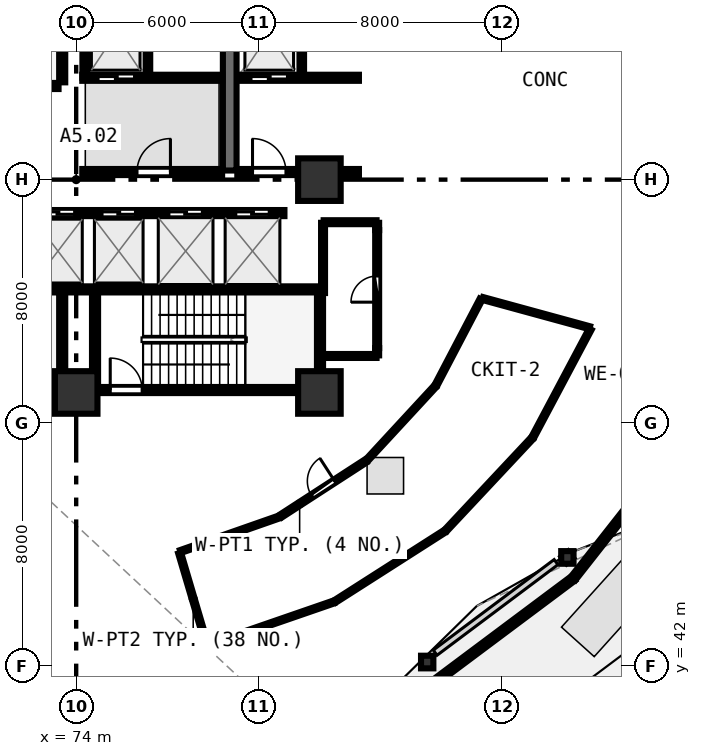
"""IFC4 building model, lengths in metres.
Left out: names, types, materials, properties, quantities, classifications, styles, units other than length and angle.
Written with IfcOpenShell. Run it as: python <this file> out.ifc"""

import sys

from ifc_helpers import new_model, si_unit, direction, frame, frame_2d, origin, origin_2d, place, context, subcontext, project, spatial, rectangle, i_section, extrude, element, fill, save


model = new_model("IFC4")
c1 = context("Model", 3, precision=1e-05, world=origin(), true_north=direction((0.0, 1.0)))
c2 = subcontext(c1, "Body", "Model", "MODEL_VIEW")
j1 = project(units=[si_unit("LENGTHUNIT", "METRE"), si_unit("PLANEANGLEUNIT", "RADIAN")], contexts=[c1])
p1 = place(None, origin())
s1 = spatial("IfcSite", under=j1, at=p1, CompositionType="ELEMENT")
p2 = place(p1, origin())
s2 = spatial("IfcBuilding", under=s1, at=p2, CompositionType="ELEMENT")
p3 = place(p2, origin())
s3 = spatial("IfcBuildingStorey", under=s2, at=p3, CompositionType="ELEMENT", Elevation=0.0)
for number, where, z_axis, x_axis in (
    (1, (74.0, 51.0, 0.0), (0.0, 0.0, 1.0), (1.0, 0.0, 0.0)),
    (2, (82.0, 51.0, 0.0), (0.0, 0.0, 1.0), (1.0, 0.0, 0.0)),
    (3, (82.0, 58.0, 0.0), (0.0, 0.0, 1.0), (1.0, 0.0, 0.0)),
):
    element("IfcColumn", number, at=place(p3, frame(where, z_axis=z_axis, x_axis=x_axis)), inside=s3, PredefinedType="PILASTER", context=c2, shape_type="SweptSolid", body=[
        extrude(rectangle(XDim=1.4, YDim=1.4, at=origin_2d()), origin(), (0.0, 0.0, 1.0), 4.5),
    ])
for number, where, z_axis, x_axis in (
    (4, (85.546, 42.134, 0.0), (0.0, 0.0, 1.0), (1.0, 0.0, 0.0)),
    (5, (90.156, 45.574, 0.0), (0.0, 0.0, 1.0), (1.0, 0.0, 0.0)),
):
    element("IfcColumn", number, at=place(p3, frame(where, z_axis=z_axis, x_axis=x_axis)), inside=s3, PredefinedType="COLUMN", context=c2, shape_type="SweptSolid", body=[
        extrude(i_section(OverallWidth=0.406, OverallDepth=0.416, WebThickness=0.029, FlangeThickness=0.048, FilletRadius=0.015, at=origin_2d()), origin(), (0.0, 0.0, 1.0), 4.5),
    ])
p4 = place(p3, frame((85.658, 41.378, 0.0), z_axis=(0.0, 0.0, 1.0), x_axis=(0.800949430728, 0.59873200133, 0.0)))
e6 = element("IfcWall", 6, at=p4, inside=s3, PredefinedType="PARAPET", context=c2, shape_type="SweptSolid", body=[
    extrude(rectangle(XDim=5.857, YDim=0.19, at=frame_2d((2.928, 0.0))), origin(), (0.0, 0.0, 1.0), 0.62),
])
p5 = place(p3, frame((90.349, 44.885, 0.0), z_axis=(0.0, 0.0, 1.0), x_axis=(0.617936357215, 0.786228121115, 0.0)))
e7 = element("IfcWall", 7, at=p5, inside=s3, PredefinedType="PARAPET", context=c2, shape_type="SweptSolid", body=[
    extrude(rectangle(XDim=4.977, YDim=0.19, at=frame_2d((2.489, 0.0))), origin(), (0.0, 0.0, 1.0), 0.62),
])
p6 = place(p3, frame((66.26, 61.08, 0.0), z_axis=(0.0, 0.0, 1.0), x_axis=(1.0, 0.0, 0.0)))
e8 = element("IfcWall", 8, at=p6, inside=s3, PredefinedType="SHEAR", context=c2, shape_type="SweptSolid", body=[
    extrude(rectangle(XDim=7.16, YDim=0.2, at=frame_2d((3.58, 0.0))), origin(), (0.0, 0.0, 1.0), 4.2),
])
p7 = place(p3, frame((73.54, 61.2, 0.0), z_axis=(0.0, 0.0, 1.0), x_axis=(0.0, 1.0, 0.0)))
e9 = element("IfcWall", 9, at=p7, inside=s3, PredefinedType="SHEAR", context=c2, shape_type="SweptSolid", body=[
    extrude(rectangle(XDim=3.07, YDim=0.2, at=frame_2d((1.535, 0.0))), origin(), (0.0, 0.0, 1.0), 4.2),
])
p8 = place(p3, frame((74.0, 51.08, 0.0), z_axis=(0.0, 0.0, 1.0), x_axis=(1.0, 0.0, 0.0)))
e10 = element("IfcWall", 10, at=p8, inside=s3, PredefinedType="SHEAR", context=c2, shape_type="SweptSolid", body=[
    extrude(rectangle(XDim=7.9, YDim=0.2, at=frame_2d((3.95, 0.0))), origin(), (0.0, 0.0, 1.0), 4.2),
])
p9 = place(p8, frame((1.12, 0.0, 0.0)))
e11 = element("IfcOpeningElement", 11, at=p9, cuts=e10, PredefinedType="OPENING", context=c2, shape_type="SweptSolid", body=[
    extrude(rectangle(XDim=1.05, YDim=2.1, at=frame_2d((0.525, 1.05))), frame((0.0, 0.11, 0.0), z_axis=(0.0, -1.0, 0.0), x_axis=(1.0, 0.0, 0.0)), (0.0, 0.0, 1.0), 0.22),
])
p10 = place(p3, frame((82.02, 51.2, 0.0), z_axis=(0.0, 0.0, 1.0), x_axis=(0.0, 1.0, 0.0)))
e12 = element("IfcWall", 12, at=p10, inside=s3, PredefinedType="SHEAR", context=c2, shape_type="SweptSolid", body=[
    extrude(rectangle(XDim=3.07, YDim=0.2, at=frame_2d((1.535, 0.0))), origin(), (0.0, 0.0, 1.0), 4.2),
])
p11 = place(p3, frame((81.9, 54.39, 0.0), z_axis=(0.0, 0.0, 1.0), x_axis=(-1.0, 0.0, 0.0)))
e13 = element("IfcWall", 13, at=p11, inside=s3, PredefinedType="SHEAR", context=c2, shape_type="SweptSolid", body=[
    extrude(rectangle(XDim=8.46, YDim=0.2, at=frame_2d((4.23, 0.0))), origin(), (0.0, 0.0, 1.0), 4.2),
])
p12 = place(p3, frame((74.62, 54.27, 0.0), z_axis=(0.0, 0.0, 1.0), x_axis=(0.0, -1.0, 0.0)))
e14 = element("IfcWall", 14, at=p12, inside=s3, PredefinedType="SHEAR", context=c2, shape_type="SweptSolid", body=[
    extrude(rectangle(XDim=3.07, YDim=0.2, at=frame_2d((1.535, 0.0))), origin(), (0.0, 0.0, 1.0), 4.2),
])
p13 = place(p3, frame((66.26, 51.08, 0.0), z_axis=(0.0, 0.0, 1.0), x_axis=(1.0, 0.0, 0.0)))
e15 = element("IfcWall", 15, at=p13, inside=s3, PredefinedType="SHEAR", context=c2, shape_type="SweptSolid", body=[
    extrude(rectangle(XDim=7.16, YDim=0.2, at=frame_2d((3.58, 0.0))), origin(), (0.0, 0.0, 1.0), 4.2),
])
p14 = place(p3, frame((73.54, 51.2, 0.0), z_axis=(0.0, 0.0, 1.0), x_axis=(0.0, 1.0, 0.0)))
e16 = element("IfcWall", 16, at=p14, inside=s3, PredefinedType="SHEAR", context=c2, shape_type="SweptSolid", body=[
    extrude(rectangle(XDim=3.07, YDim=0.2, at=frame_2d((1.535, 0.0))), origin(), (0.0, 0.0, 1.0), 4.2),
])
p15 = place(p3, frame((73.42, 54.39, 0.0), z_axis=(0.0, 0.0, 1.0), x_axis=(-1.0, 0.0, 0.0)))
e17 = element("IfcWall", 17, at=p15, inside=s3, PredefinedType="SHEAR", context=c2, shape_type="SweptSolid", body=[
    extrude(rectangle(XDim=7.16, YDim=0.2, at=frame_2d((3.58, 0.0))), origin(), (0.0, 0.0, 1.0), 4.2),
])
p16 = place(p3, frame((79.05, 58.3, 0.0), z_axis=(0.0, 0.0, 1.0), x_axis=(0.0, 1.0, 0.0)))
e18 = element("IfcWall", 18, at=p16, inside=s3, PredefinedType="SHEAR", context=c2, shape_type="SweptSolid", body=[
    extrude(rectangle(XDim=6.3, YDim=0.45, at=frame_2d((3.15, 0.0))), origin(), (0.0, 0.0, 1.0), 4.2),
])
p17 = place(p3, frame((74.2, 61.35, 0.0), z_axis=(0.0, 0.0, 1.0), x_axis=(1.0, 0.0, 0.0)))
e19 = element("IfcWall", 19, at=p17, inside=s3, PredefinedType="SOLIDWALL", context=c2, shape_type="SweptSolid", body=[
    extrude(rectangle(XDim=4.6, YDim=0.2, at=frame_2d((2.3, 0.0))), origin(), (0.0, 0.0, 1.0), 4.19),
])
p18 = place(p17, frame((0.52, 0.0, 0.0)))
e20 = element("IfcOpeningElement", 20, at=p18, cuts=e19, PredefinedType="OPENING", context=c2, shape_type="SweptSolid", body=[
    extrude(rectangle(XDim=1.2, YDim=2.15, at=frame_2d((0.6, 1.075))), frame((0.0, 0.11, 0.0), z_axis=(0.0, -1.0, 0.0), x_axis=(1.0, 0.0, 0.0)), (0.0, 0.0, 1.0), 0.22),
])
p19 = place(p3, frame((74.28, 61.35, 0.0), z_axis=(0.0, 0.0, 1.0), x_axis=(0.0, 1.0, 0.0)))
e21 = element("IfcWall", 21, at=p19, inside=s3, PredefinedType="PARTITIONING", context=c2, shape_type="SweptSolid", body=[
    extrude(rectangle(XDim=2.97, YDim=0.15, at=frame_2d((1.485, 0.0))), origin(), (0.0, 0.0, 1.0), 4.19),
])
p20 = place(p3, frame((76.36, 61.48, 0.0), z_axis=(0.0, 0.0, 1.0), x_axis=(0.0, 1.0, 0.0)))
e22 = element("IfcWall", 22, at=p20, inside=s3, PredefinedType="PARTITIONING", context=c2, shape_type="SweptSolid", body=[
    extrude(rectangle(XDim=2.84, YDim=0.15, at=frame_2d((1.42, 0.0))), origin(), (0.0, 0.0, 1.0), 4.19),
])
p21 = place(p3, frame((79.3, 61.35, 0.0), z_axis=(0.0, 0.0, 1.0), x_axis=(1.0, 0.0, 0.0)))
e23 = element("IfcWall", 23, at=p21, inside=s3, PredefinedType="SOLIDWALL", context=c2, shape_type="SweptSolid", body=[
    extrude(rectangle(XDim=4.0, YDim=0.2, at=frame_2d((2.0, 0.0))), origin(), (0.0, 0.0, 1.0), 3.485),
])
p22 = place(p21, frame((0.45, 0.0, 0.0)))
e24 = element("IfcOpeningElement", 24, at=p22, cuts=e23, PredefinedType="OPENING", context=c2, shape_type="SweptSolid", body=[
    extrude(rectangle(XDim=1.2, YDim=2.15, at=frame_2d((0.6, 1.075))), frame((0.0, 0.11, 0.0), z_axis=(0.0, -1.0, 0.0), x_axis=(1.0, 0.0, 0.0)), (0.0, 0.0, 1.0), 0.22),
])
p23 = place(p3, frame((81.42, 61.48, 0.0), z_axis=(0.0, 0.0, 1.0), x_axis=(0.0, 1.0, 0.0)))
e25 = element("IfcWall", 25, at=p23, inside=s3, PredefinedType="PARTITIONING", context=c2, shape_type="SweptSolid", body=[
    extrude(rectangle(XDim=2.84, YDim=0.15, at=frame_2d((1.42, 0.0))), origin(), (0.0, 0.0, 1.0), 4.19),
])
p24 = place(p3, frame((74.2, 58.25, 0.0), z_axis=(0.0, 0.0, 1.0), x_axis=(1.0, 0.0, 0.0)))
e26 = element("IfcWall", 26, at=p24, inside=s3, PredefinedType="SOLIDWALL", context=c2, shape_type="SweptSolid", body=[
    extrude(rectangle(XDim=4.6, YDim=0.2, at=frame_2d((2.3, 0.0))), origin(), (0.0, 0.0, 1.0), 4.19),
])
p25 = place(p24, frame((1.8, 0.0, 0.0)))
e27 = element("IfcOpeningElement", 27, at=p25, cuts=e26, PredefinedType="OPENING", context=c2, shape_type="SweptSolid", body=[
    extrude(rectangle(XDim=1.1, YDim=2.1, at=frame_2d((0.55, 1.05))), frame((0.0, 0.11, 0.0), z_axis=(0.0, -1.0, 0.0), x_axis=(1.0, 0.0, 0.0)), (0.0, 0.0, 1.0), 0.22),
])
p26 = place(p3, frame((79.3, 58.25, 0.0), z_axis=(0.0, 0.0, 1.0), x_axis=(1.0, 0.0, 0.0)))
e28 = element("IfcWall", 28, at=p26, inside=s3, PredefinedType="SOLIDWALL", context=c2, shape_type="SweptSolid", body=[
    extrude(rectangle(XDim=4.0, YDim=0.2, at=frame_2d((2.0, 0.0))), origin(), (0.0, 0.0, 1.0), 3.485),
])
p27 = place(p26, frame((0.5, 0.0, 0.0)))
e29 = element("IfcOpeningElement", 29, at=p27, cuts=e28, PredefinedType="OPENING", context=c2, shape_type="SweptSolid", body=[
    extrude(rectangle(XDim=1.1, YDim=2.1, at=frame_2d((0.55, 1.05))), frame((0.0, 0.11, 0.0), z_axis=(0.0, -1.0, 0.0), x_axis=(1.0, 0.0, 0.0)), (0.0, 0.0, 1.0), 0.22),
])
p28 = place(p3, frame((66.45, 56.9, 0.0), z_axis=(0.0, 0.0, 1.0), x_axis=(1.0, 0.0, 0.0)))
e30 = element("IfcWall", 30, at=p28, inside=s3, PredefinedType="SOLIDWALL", context=c2, shape_type="SweptSolid", body=[
    extrude(rectangle(XDim=14.4, YDim=0.2, at=frame_2d((7.2, 0.0))), origin(), (0.0, 0.0, 1.0), 4.19),
])
p29 = place(p28, frame((0.4, 0.0, 0.0)))
e31 = element("IfcOpeningElement", 31, at=p29, cuts=e30, PredefinedType="OPENING", context=c2, shape_type="SweptSolid", body=[
    extrude(rectangle(XDim=1.1, YDim=2.1, at=frame_2d((0.55, 1.05))), frame((0.0, 0.11, 0.0), z_axis=(0.0, -1.0, 0.0), x_axis=(1.0, 0.0, 0.0)), (0.0, 0.0, 1.0), 0.22),
])
p30 = place(p28, frame((2.4, 0.0, 0.0)))
e32 = element("IfcOpeningElement", 32, at=p30, cuts=e30, PredefinedType="OPENING", context=c2, shape_type="SweptSolid", body=[
    extrude(rectangle(XDim=1.1, YDim=2.1, at=frame_2d((0.55, 1.05))), frame((0.0, 0.11, 0.0), z_axis=(0.0, -1.0, 0.0), x_axis=(1.0, 0.0, 0.0)), (0.0, 0.0, 1.0), 0.22),
])
p31 = place(p28, frame((4.4, 0.0, 0.0)))
e33 = element("IfcOpeningElement", 33, at=p31, cuts=e30, PredefinedType="OPENING", context=c2, shape_type="SweptSolid", body=[
    extrude(rectangle(XDim=1.1, YDim=2.1, at=frame_2d((0.55, 1.05))), frame((0.0, 0.11, 0.0), z_axis=(0.0, -1.0, 0.0), x_axis=(1.0, 0.0, 0.0)), (0.0, 0.0, 1.0), 0.22),
])
p32 = place(p28, frame((6.4, 0.0, 0.0)))
e34 = element("IfcOpeningElement", 34, at=p32, cuts=e30, PredefinedType="OPENING", context=c2, shape_type="SweptSolid", body=[
    extrude(rectangle(XDim=1.1, YDim=2.1, at=frame_2d((0.55, 1.05))), frame((0.0, 0.11, 0.0), z_axis=(0.0, -1.0, 0.0), x_axis=(1.0, 0.0, 0.0)), (0.0, 0.0, 1.0), 0.22),
])
p33 = place(p28, frame((8.4, 0.0, 0.0)))
e35 = element("IfcOpeningElement", 35, at=p33, cuts=e30, PredefinedType="OPENING", context=c2, shape_type="SweptSolid", body=[
    extrude(rectangle(XDim=1.1, YDim=2.1, at=frame_2d((0.55, 1.05))), frame((0.0, 0.11, 0.0), z_axis=(0.0, -1.0, 0.0), x_axis=(1.0, 0.0, 0.0)), (0.0, 0.0, 1.0), 0.22),
])
p34 = place(p28, frame((10.6, 0.0, 0.0)))
e36 = element("IfcOpeningElement", 36, at=p34, cuts=e30, PredefinedType="OPENING", context=c2, shape_type="SweptSolid", body=[
    extrude(rectangle(XDim=1.1, YDim=2.1, at=frame_2d((0.55, 1.05))), frame((0.0, 0.11, 0.0), z_axis=(0.0, -1.0, 0.0), x_axis=(1.0, 0.0, 0.0)), (0.0, 0.0, 1.0), 0.22),
])
p35 = place(p28, frame((12.8, 0.0, 0.0)))
e37 = element("IfcOpeningElement", 37, at=p35, cuts=e30, PredefinedType="OPENING", context=c2, shape_type="SweptSolid", body=[
    extrude(rectangle(XDim=1.1, YDim=2.1, at=frame_2d((0.55, 1.05))), frame((0.0, 0.11, 0.0), z_axis=(0.0, -1.0, 0.0), x_axis=(1.0, 0.0, 0.0)), (0.0, 0.0, 1.0), 0.22),
])
p36 = place(p3, frame((83.9, 52.46, 0.0), z_axis=(0.0, 0.0, 1.0), x_axis=(0.0, 1.0, 0.0)))
e38 = element("IfcWall", 38, at=p36, inside=s3, PredefinedType="PLUMBINGWALL", context=c2, shape_type="SweptSolid", body=[
    extrude(rectangle(XDim=3.88, YDim=0.13, at=frame_2d((1.94, 0.0))), origin(), (0.0, 0.0, 1.0), 4.19),
])
p37 = place(p36, frame((1.51, 0.0, 0.0)))
e39 = element("IfcOpeningElement", 39, at=p37, cuts=e38, PredefinedType="OPENING", context=c2, shape_type="SweptSolid", body=[
    extrude(rectangle(XDim=0.86, YDim=2.05, at=frame_2d((0.43, 1.025))), frame((0.0, 0.075, 0.0), z_axis=(0.0, -1.0, 0.0), x_axis=(1.0, 0.0, 0.0)), (0.0, 0.0, 1.0), 0.15),
])
p38 = place(p3, frame((80.74, 46.942, 0.0), z_axis=(0.0, 0.0, 1.0), x_axis=(0.839224842152, 0.543784575282, 0.0)))
e40 = element("IfcWall", 40, at=p38, inside=s3, PredefinedType="PARTITIONING", context=c2, shape_type="SweptSolid", body=[
    extrude(rectangle(XDim=3.302, YDim=0.12, at=frame_2d((1.651, 0.0))), origin(), (0.0, 0.0, 1.0), 3.585),
])
p39 = place(p38, frame((1.201, 0.0, 0.0)))
e41 = element("IfcOpeningElement", 41, at=p39, cuts=e40, PredefinedType="OPENING", context=c2, shape_type="SweptSolid", body=[
    extrude(rectangle(XDim=0.9, YDim=2.08, at=frame_2d((0.45, 1.04))), frame((0.0, 0.07, 0.0), z_axis=(0.0, -1.0, 0.0), x_axis=(1.0, 0.0, 0.0)), (0.0, 0.0, 1.0), 0.14),
])
p40 = place(p3, frame((82.14, 52.2, 0.0), z_axis=(0.0, 0.0, 1.0), x_axis=(1.0, 0.0, 0.0)))
e42 = element("IfcWall", 42, at=p40, inside=s3, PredefinedType="PLUMBINGWALL", context=c2, shape_type="SweptSolid", body=[
    extrude(rectangle(XDim=1.74, YDim=0.13, at=frame_2d((0.87, 0.0))), origin(), (0.0, 0.0, 1.0), 3.485),
])
for number, where, z_axis, x_axis in (
    (43, (83.9, 52.22, 0.0), (0.0, 0.0, 1.0), (0.0, 1.0, 0.0)),
    (44, (83.9, 56.34, 0.0), (0.0, 0.0, 1.0), (0.0, 1.0, 0.0)),
):
    element("IfcWall", number, at=place(p3, frame(where, z_axis=z_axis, x_axis=x_axis)), inside=s3, PredefinedType="PLUMBINGWALL", context=c2, shape_type="SweptSolid", body=[
        extrude(rectangle(XDim=0.24, YDim=0.13, at=frame_2d((0.12, 0.0))), origin(), (0.0, 0.0, 1.0), 4.19),
    ])
p41 = place(p3, frame((83.88, 56.6, 0.0), z_axis=(0.0, 0.0, 1.0), x_axis=(-1.0, 0.0, 0.0)))
e45 = element("IfcWall", 45, at=p41, inside=s3, PredefinedType="PLUMBINGWALL", context=c2, shape_type="SweptSolid", body=[
    extrude(rectangle(XDim=1.74, YDim=0.13, at=frame_2d((0.87, 0.0))), origin(), (0.0, 0.0, 1.0), 3.485),
])
p42 = place(p3, frame((82.12, 56.58, 0.0), z_axis=(0.0, 0.0, 1.0), x_axis=(0.0, -1.0, 0.0)))
e46 = element("IfcWall", 46, at=p42, inside=s3, PredefinedType="PLUMBINGWALL", context=c2, shape_type="SweptSolid", body=[
    extrude(rectangle(XDim=2.31, YDim=0.13, at=frame_2d((1.155, 0.0))), origin(), (0.0, 0.0, 1.0), 3.485),
])
p43 = place(p3, frame((77.43, 45.768, 0.0), z_axis=(0.0, 0.0, 1.0), x_axis=(0.943895142086, 0.330245303898, 0.0)))
e47 = element("IfcWall", 47, at=p43, inside=s3, PredefinedType="PARTITIONING", context=c2, shape_type="SweptSolid", body=[
    extrude(rectangle(XDim=3.414, YDim=0.1, at=frame_2d((1.707, 0.0))), origin(), (0.0, 0.0, 1.0), 4.19),
])
p44 = place(p3, frame((83.589, 48.799, 0.0), z_axis=(0.0, 0.0, 1.0), x_axis=(0.678488862619, 0.734610688257, 0.0)))
e48 = element("IfcWall", 48, at=p44, inside=s3, PredefinedType="PARTITIONING", context=c2, shape_type="SweptSolid", body=[
    extrude(rectangle(XDim=3.254, YDim=0.1, at=frame_2d((1.627, 0.0))), origin(), (0.0, 0.0, 1.0), 3.585),
])
p45 = place(p3, frame((85.843, 51.254, 0.0), z_axis=(0.0, 0.0, 1.0), x_axis=(0.464213996316, 0.885723075021, 0.0)))
e49 = element("IfcWall", 49, at=p45, inside=s3, PredefinedType="PARTITIONING", context=c2, shape_type="SweptSolid", body=[
    extrude(rectangle(XDim=3.173, YDim=0.1, at=frame_2d((1.586, 0.0))), origin(), (0.0, 0.0, 1.0), 4.19),
])
p46 = place(p3, frame((87.373, 54.09, 0.0), z_axis=(0.0, 0.0, 1.0), x_axis=(0.964640120238, -0.263570556831, 0.0)))
e50 = element("IfcWall", 50, at=p46, inside=s3, PredefinedType="PARTITIONING", context=c2, shape_type="SweptSolid", body=[
    extrude(rectangle(XDim=3.647, YDim=0.1, at=frame_2d((1.823, 0.0))), origin(), (0.0, 0.0, 1.0), 3.945),
])
p47 = place(p3, frame((90.91, 53.083, 0.0), z_axis=(0.0, 0.0, 1.0), x_axis=(-0.469290424741, -0.883043881835, 0.0)))
e51 = element("IfcWall", 51, at=p47, inside=s3, PredefinedType="PARTITIONING", context=c2, shape_type="SweptSolid", body=[
    extrude(rectangle(XDim=4.005, YDim=0.1, at=frame_2d((2.002, 0.0))), origin(), (0.0, 0.0, 1.0), 3.585),
])
p48 = place(p3, frame((88.985, 49.482, 0.0), z_axis=(0.0, 0.0, 1.0), x_axis=(-0.683655334271, -0.729805031446, 0.0)))
e52 = element("IfcWall", 52, at=p48, inside=s3, PredefinedType="PARTITIONING", context=c2, shape_type="SweptSolid", body=[
    extrude(rectangle(XDim=4.121, YDim=0.1, at=frame_2d((2.061, 0.0))), origin(), (0.0, 0.0, 1.0), 3.585),
])
p49 = place(p3, frame((86.106, 46.424, 0.0), z_axis=(0.0, 0.0, 1.0), x_axis=(-0.842680324252, -0.538414218905, 0.0)))
e53 = element("IfcWall", 53, at=p49, inside=s3, PredefinedType="PARTITIONING", context=c2, shape_type="SweptSolid", body=[
    extrude(rectangle(XDim=4.248, YDim=0.1, at=frame_2d((2.124, 0.0))), origin(), (0.0, 0.0, 1.0), 3.585),
])
p50 = place(p3, frame((82.455, 44.102, 0.0), z_axis=(0.0, 0.0, 1.0), x_axis=(-0.945232717828, -0.326397164737, 0.0)))
e54 = element("IfcWall", 54, at=p50, inside=s3, PredefinedType="PARTITIONING", context=c2, shape_type="SweptSolid", body=[
    extrude(rectangle(XDim=4.35, YDim=0.1, at=frame_2d((2.175, 0.0))), origin(), (0.0, 0.0, 1.0), 3.585),
])
p51 = place(p3, frame((78.295, 42.708, 0.0), z_axis=(0.0, 0.0, 1.0), x_axis=(-0.284027408145, 0.958816161432, 0.0)))
e55 = element("IfcWall", 55, at=p51, inside=s3, PredefinedType="PARTITIONING", context=c2, shape_type="SweptSolid", body=[
    extrude(rectangle(XDim=3.138, YDim=0.1, at=frame_2d((1.569, 0.0))), origin(), (0.0, 0.0, 1.0), 3.945),
])
p52 = place(p9, origin())
e56 = element("IfcDoor", 56, at=p52, inside=s3, OperationType="SINGLE_SWING_LEFT", PredefinedType="DOOR", context=c2, shape_type="SweptSolid", body=[
    extrude(rectangle(XDim=1.05, YDim=2.1, at=frame_2d((0.525, 1.05))), frame((0.0, 0.025, 0.0), z_axis=(0.0, -1.0, 0.0), x_axis=(1.0, 0.0, 0.0)), (0.0, 0.0, 1.0), 0.05),
])
fill(e11, e56)
p53 = place(p18, origin())
e57 = element("IfcDoor", 57, at=p53, inside=s3, OperationType="DOUBLE_DOOR_SLIDING", PredefinedType="DOOR", context=c2, shape_type="SweptSolid", body=[
    extrude(rectangle(XDim=1.2, YDim=2.15, at=frame_2d((0.6, 1.075))), frame((0.0, 0.025, 0.0), z_axis=(0.0, -1.0, 0.0), x_axis=(1.0, 0.0, 0.0)), (0.0, 0.0, 1.0), 0.05),
])
fill(e20, e57)
p54 = place(p22, origin())
e58 = element("IfcDoor", 58, at=p54, inside=s3, OperationType="DOUBLE_DOOR_SLIDING", PredefinedType="DOOR", context=c2, shape_type="SweptSolid", body=[
    extrude(rectangle(XDim=1.2, YDim=2.15, at=frame_2d((0.6, 1.075))), frame((0.0, 0.025, 0.0), z_axis=(0.0, -1.0, 0.0), x_axis=(1.0, 0.0, 0.0)), (0.0, 0.0, 1.0), 0.05),
])
fill(e24, e58)
p55 = place(p25, frame((1.1, 0.0, 0.0), z_axis=(0.0, 0.0, 1.0), x_axis=(-1.0, 0.0, 0.0)))
e59 = element("IfcDoor", 59, at=p55, inside=s3, OperationType="SINGLE_SWING_LEFT", PredefinedType="DOOR", context=c2, shape_type="SweptSolid", body=[
    extrude(rectangle(XDim=1.1, YDim=2.1, at=frame_2d((0.55, 1.05))), frame((0.0, 0.025, 0.0), z_axis=(0.0, -1.0, 0.0), x_axis=(1.0, 0.0, 0.0)), (0.0, 0.0, 1.0), 0.05),
])
fill(e27, e59)
p56 = place(p27, frame((1.1, 0.0, 0.0), z_axis=(0.0, 0.0, 1.0), x_axis=(-1.0, 0.0, 0.0)))
e60 = element("IfcDoor", 60, at=p56, inside=s3, OperationType="SINGLE_SWING_RIGHT", PredefinedType="DOOR", context=c2, shape_type="SweptSolid", body=[
    extrude(rectangle(XDim=1.1, YDim=2.1, at=frame_2d((0.55, 1.05))), frame((0.0, 0.025, 0.0), z_axis=(0.0, -1.0, 0.0), x_axis=(1.0, 0.0, 0.0)), (0.0, 0.0, 1.0), 0.05),
])
fill(e29, e60)
p57 = place(p32, origin())
e61 = element("IfcDoor", 61, at=p57, inside=s3, OperationType="DOUBLE_DOOR_SLIDING", PredefinedType="DOOR", context=c2, shape_type="SweptSolid", body=[
    extrude(rectangle(XDim=1.1, YDim=2.1, at=frame_2d((0.55, 1.05))), frame((0.0, 0.025, 0.0), z_axis=(0.0, -1.0, 0.0), x_axis=(1.0, 0.0, 0.0)), (0.0, 0.0, 1.0), 0.05),
])
fill(e34, e61)
p58 = place(p33, origin())
e62 = element("IfcDoor", 62, at=p58, inside=s3, OperationType="DOUBLE_DOOR_SLIDING", PredefinedType="DOOR", context=c2, shape_type="SweptSolid", body=[
    extrude(rectangle(XDim=1.1, YDim=2.1, at=frame_2d((0.55, 1.05))), frame((0.0, 0.025, 0.0), z_axis=(0.0, -1.0, 0.0), x_axis=(1.0, 0.0, 0.0)), (0.0, 0.0, 1.0), 0.05),
])
fill(e35, e62)
p59 = place(p34, origin())
e63 = element("IfcDoor", 63, at=p59, inside=s3, OperationType="DOUBLE_DOOR_SLIDING", PredefinedType="DOOR", context=c2, shape_type="SweptSolid", body=[
    extrude(rectangle(XDim=1.1, YDim=2.1, at=frame_2d((0.55, 1.05))), frame((0.0, 0.025, 0.0), z_axis=(0.0, -1.0, 0.0), x_axis=(1.0, 0.0, 0.0)), (0.0, 0.0, 1.0), 0.05),
])
fill(e36, e63)
p60 = place(p35, origin())
e64 = element("IfcDoor", 64, at=p60, inside=s3, OperationType="DOUBLE_DOOR_SLIDING", PredefinedType="DOOR", context=c2, shape_type="SweptSolid", body=[
    extrude(rectangle(XDim=1.1, YDim=2.1, at=frame_2d((0.55, 1.05))), frame((0.0, 0.025, 0.0), z_axis=(0.0, -1.0, 0.0), x_axis=(1.0, 0.0, 0.0)), (0.0, 0.0, 1.0), 0.05),
])
fill(e37, e64)
p61 = place(p37, origin())
e65 = element("IfcDoor", 65, at=p61, inside=s3, OperationType="SINGLE_SWING_LEFT", PredefinedType="DOOR", context=c2, shape_type="SweptSolid", body=[
    extrude(rectangle(XDim=0.86, YDim=2.05, at=frame_2d((0.43, 1.025))), frame((0.0, 0.025, 0.0), z_axis=(0.0, -1.0, 0.0), x_axis=(1.0, 0.0, 0.0)), (0.0, 0.0, 1.0), 0.05),
])
fill(e39, e65)
p62 = place(p39, origin())
e66 = element("IfcDoor", 66, at=p62, inside=s3, OperationType="SINGLE_SWING_RIGHT", PredefinedType="DOOR", context=c2, shape_type="SweptSolid", body=[
    extrude(rectangle(XDim=0.9, YDim=2.08, at=frame_2d((0.45, 1.04))), frame((0.0, 0.025, 0.0), z_axis=(0.0, -1.0, 0.0), x_axis=(1.0, 0.0, 0.0)), (0.0, 0.0, 1.0), 0.05),
])
fill(e41, e66)
save(model, sys.argv[1])
